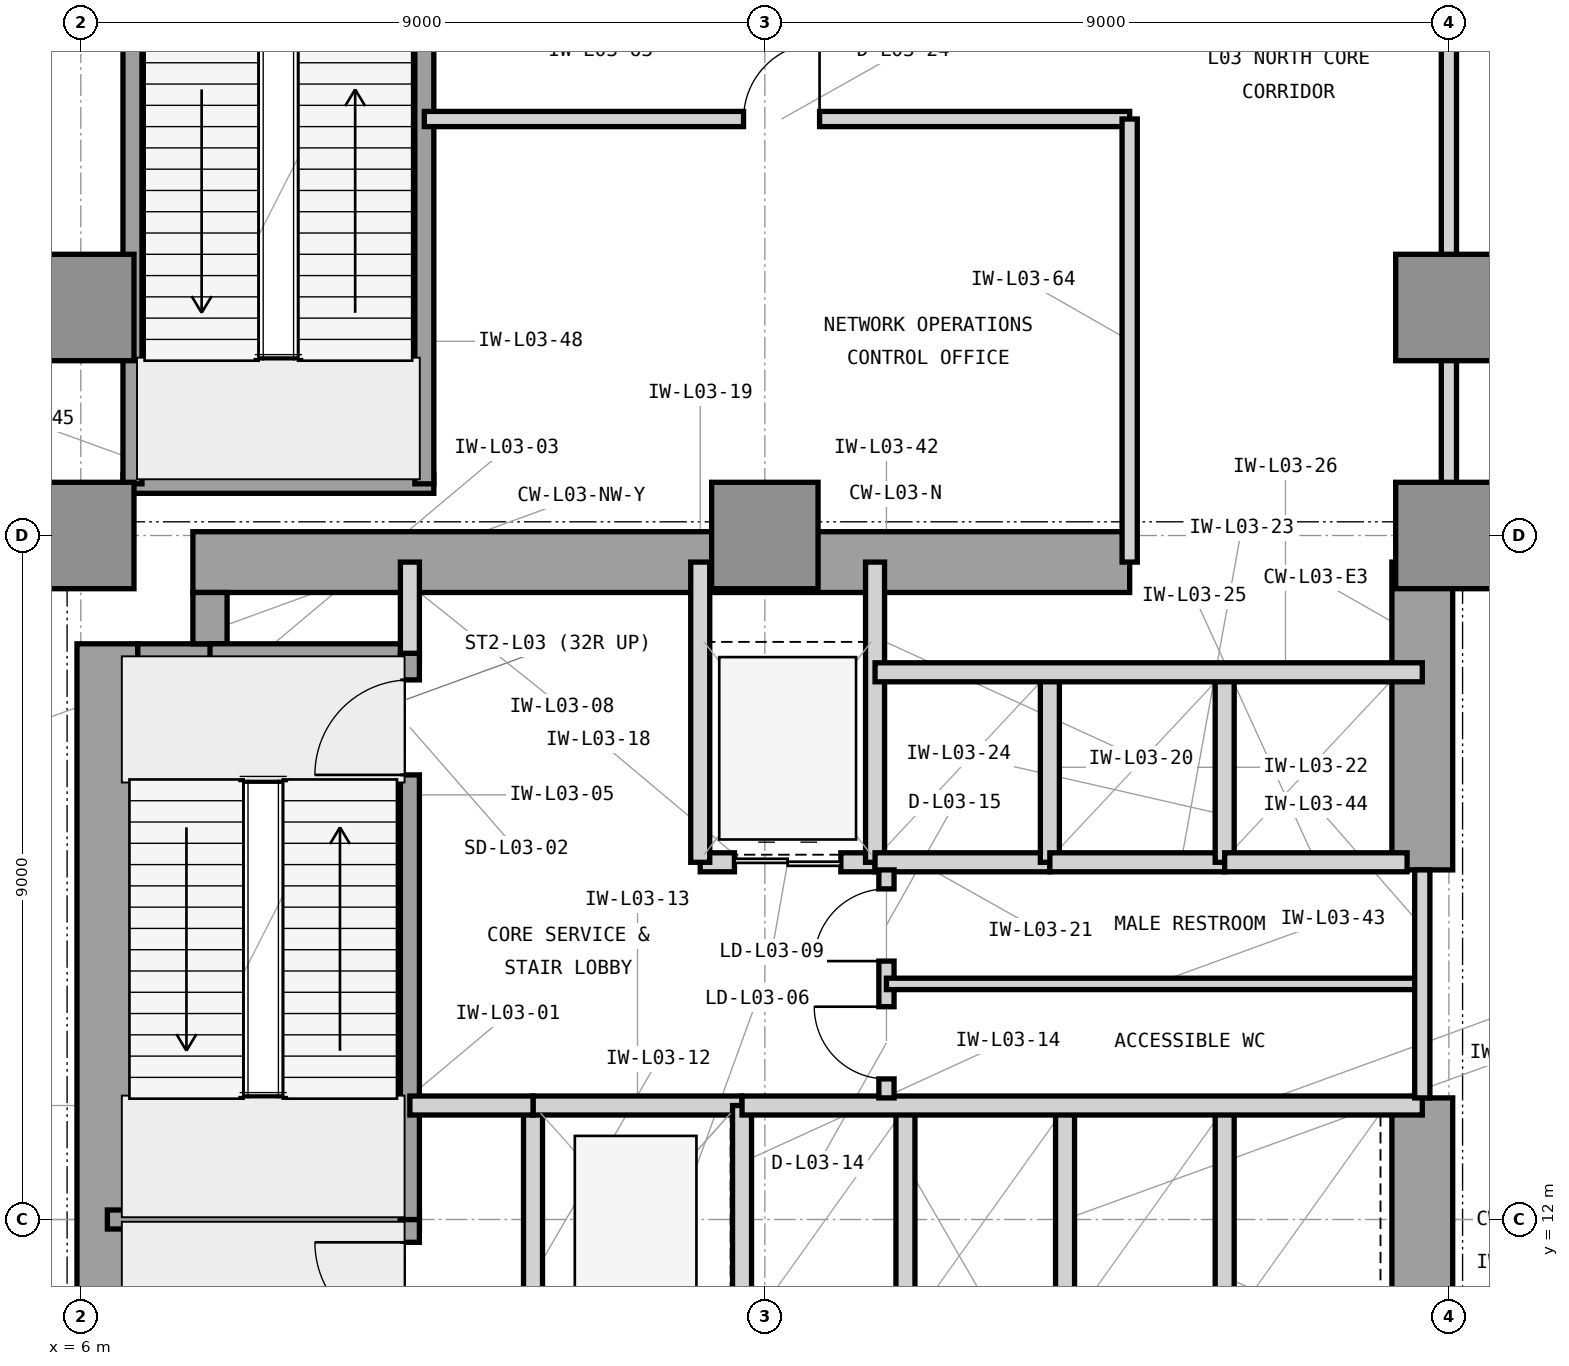
"""IFC4 building model, lengths in metres.
Left out: names, types, materials, properties, quantities, classifications, styles, units other than length and angle.
Written with IfcOpenShell. Run it as: python <this file> out.ifc"""

import sys

from ifc_helpers import new_model, si_unit, direction, frame, frame_2d, origin, origin_2d, place, context, subcontext, project, spatial, rectangle, extrude, element, fill, save


model = new_model("IFC4")
c1 = context("Model", 3, precision=1e-05, world=origin(), true_north=direction((0.0, 1.0)))
c2 = subcontext(c1, "Body", "Model", "MODEL_VIEW")
j1 = project(units=[si_unit("LENGTHUNIT", "METRE"), si_unit("PLANEANGLEUNIT", "RADIAN")], contexts=[c1])
p1 = place(None, origin())
s1 = spatial("IfcSite", under=j1, at=p1, CompositionType="ELEMENT")
p2 = place(p1, origin())
s2 = spatial("IfcBuilding", under=s1, at=p2, CompositionType="ELEMENT")
p3 = place(p2, frame((0.0, 0.0, 16.2)))
s3 = spatial("IfcBuildingStorey", under=s2, at=p3, CompositionType="ELEMENT", Elevation=16.2)
p4 = place(p3, frame((6.35, 4.425, 0.0), z_axis=(0.0, 0.0, 1.0), x_axis=(0.0, 1.0, 0.0)))
e1 = element("IfcWall", 1, at=p4, inside=s3, PredefinedType="SHEAR", context=c2, shape_type="SweptSolid", body=[
    extrude(rectangle(XDim=15.15, YDim=0.8, at=frame_2d((7.575, 0.0))), origin(), (0.0, 0.0, 1.0), 5.4),
])
p5 = place(p3, frame((7.475, 20.65, 0.0), z_axis=(0.0, 0.0, 1.0), x_axis=(1.0, 0.0, 0.0)))
e2 = element("IfcWall", 2, at=p5, inside=s3, PredefinedType="SHEAR", context=c2, shape_type="SweptSolid", body=[
    extrude(rectangle(XDim=12.325, YDim=0.8, at=frame_2d((6.163, 0.0))), origin(), (0.0, 0.0, 1.0), 5.4),
])
p6 = place(p3, frame((23.65, 10.4, 0.0), z_axis=(0.0, 0.0, 1.0), x_axis=(0.0, 1.0, 0.0)))
e3 = element("IfcWall", 3, at=p6, inside=s3, PredefinedType="SHEAR", context=c2, shape_type="SweptSolid", body=[
    extrude(rectangle(XDim=3.2, YDim=0.8, at=frame_2d((1.6, 0.0))), origin(), (0.0, 0.0, 1.0), 5.4),
])
p7 = place(p3, frame((23.65, 16.6, 0.0), z_axis=(0.0, 0.0, 1.0), x_axis=(0.0, 1.0, 0.0)))
e4 = element("IfcWall", 4, at=p7, inside=s3, PredefinedType="SHEAR", context=c2, shape_type="SweptSolid", body=[
    extrude(rectangle(XDim=4.05, YDim=0.8, at=frame_2d((2.025, 0.0))), origin(), (0.0, 0.0, 1.0), 5.4),
])
p8 = place(p3, frame((6.75, 19.35, 0.0), z_axis=(0.0, 0.0, 1.0), x_axis=(1.0, 0.0, 0.0)))
e5 = element("IfcWall", 5, at=p8, inside=s3, PredefinedType="SHEAR", context=c2, shape_type="SweptSolid", body=[
    extrude(rectangle(XDim=1.175, YDim=0.45, at=frame_2d((0.587, 0.0))), origin(), (0.0, 0.0, 1.0), 5.4),
])
p9 = place(p3, frame((7.7, 19.575, 0.0), z_axis=(0.0, 0.0, 1.0), x_axis=(0.0, 1.0, 0.0)))
e6 = element("IfcWall", 6, at=p9, inside=s3, PredefinedType="SHEAR", context=c2, shape_type="SweptSolid", body=[
    extrude(rectangle(XDim=0.675, YDim=0.45, at=frame_2d((0.337, 0.0))), origin(), (0.0, 0.0, 1.0), 5.4),
])
for number, where, z_axis, x_axis in (
    (7, (6.0, 21.0, -0.6), (0.0, 0.0, 1.0), (1.0, 0.0, 0.0)),
    (8, (15.0, 21.0, -0.6), (0.0, 0.0, 1.0), (1.0, 0.0, 0.0)),
    (9, (24.0, 21.0, -0.6), (0.0, 0.0, 1.0), (1.0, 0.0, 0.0)),
    (10, (6.0, 24.0, -0.6), (0.0, 0.0, 1.0), (1.0, 0.0, 0.0)),
    (11, (24.0, 24.0, -0.6), (0.0, 0.0, 1.0), (1.0, 0.0, 0.0)),
):
    element("IfcColumn", number, at=place(p3, frame(where, z_axis=z_axis, x_axis=x_axis)), inside=s3, PredefinedType="COLUMN", context=c2, shape_type="SweptSolid", body=[
        extrude(rectangle(XDim=1.4, YDim=1.4, at=origin_2d()), origin(), (0.0, 0.0, 1.0), 6.0),
    ])
p10 = place(p3, frame((6.35, 12.0, 0.0), z_axis=(0.0, 0.0, 1.0), x_axis=(1.0, 0.0, 0.0)))
e12 = element("IfcWall", 12, at=p10, inside=s3, PredefinedType="SHEAR", context=c2, shape_type="SweptSolid", body=[
    extrude(rectangle(XDim=4.105, YDim=0.25, at=frame_2d((2.052, 0.0))), origin(), (0.0, 0.0, 1.0), 5.4),
])
p11 = place(p3, frame((7.7, 19.45, 0.0), z_axis=(0.0, 0.0, 1.0), x_axis=(1.0, 0.0, 0.0)))
e13 = element("IfcWall", 13, at=p11, inside=s3, PredefinedType="SHEAR", context=c2, shape_type="SweptSolid", body=[
    extrude(rectangle(XDim=2.755, YDim=0.25, at=frame_2d((1.377, 0.0))), origin(), (0.0, 0.0, 1.0), 5.4),
])
p12 = place(p3, frame((10.33, 4.55, 0.0), z_axis=(0.0, 0.0, 1.0), x_axis=(0.0, 1.0, 0.0)))
e14 = element("IfcWall", 14, at=p12, inside=s3, PredefinedType="SHEAR", context=c2, shape_type="SweptSolid", body=[
    extrude(rectangle(XDim=7.45, YDim=0.25, at=frame_2d((3.725, 0.0))), origin(), (0.0, 0.0, 1.0), 5.4),
])
p13 = place(p12, frame((5.9, 0.0, 0.0)))
e15 = element("IfcOpeningElement", 15, at=p13, cuts=e14, PredefinedType="OPENING", context=c2, shape_type="SweptSolid", body=[
    extrude(rectangle(XDim=1.25, YDim=2.2, at=frame_2d((0.625, 1.1))), frame((0.0, 0.135, 0.0), z_axis=(0.0, -1.0, 0.0), x_axis=(1.0, 0.0, 0.0)), (0.0, 0.0, 1.0), 0.27),
])
p14 = place(p3, frame((10.33, 12.0, 0.0), z_axis=(0.0, 0.0, 1.0), x_axis=(0.0, 1.0, 0.0)))
e16 = element("IfcWall", 16, at=p14, inside=s3, PredefinedType="SHEAR", context=c2, shape_type="SweptSolid", body=[
    extrude(rectangle(XDim=7.45, YDim=0.25, at=frame_2d((3.725, 0.0))), origin(), (0.0, 0.0, 1.0), 5.4),
])
p15 = place(p14, frame((5.85, 0.0, 0.0)))
e17 = element("IfcOpeningElement", 17, at=p15, cuts=e16, PredefinedType="OPENING", context=c2, shape_type="SweptSolid", body=[
    extrude(rectangle(XDim=1.25, YDim=2.2, at=frame_2d((0.625, 1.1))), frame((0.0, 0.135, 0.0), z_axis=(0.0, -1.0, 0.0), x_axis=(1.0, 0.0, 0.0)), (0.0, 0.0, 1.0), 0.27),
])
p16 = place(p3, frame((10.33, 19.45, 0.0), z_axis=(0.0, 0.0, 1.0), x_axis=(0.0, 1.0, 0.0)))
e18 = element("IfcWall", 18, at=p16, inside=s3, PredefinedType="PARTITIONING", context=c2, shape_type="SweptSolid", body=[
    extrude(rectangle(XDim=1.2, YDim=0.25, at=frame_2d((0.6, 0.0))), origin(), (0.0, 0.0, 1.0), 4.314),
])
p17 = place(p3, frame((11.95, 10.5, 0.0), z_axis=(0.0, 0.0, 1.0), x_axis=(0.0, 1.0, 0.0)))
e19 = element("IfcWall", 19, at=p17, inside=s3, PredefinedType="PARTITIONING", context=c2, shape_type="SweptSolid", body=[
    extrude(rectangle(XDim=3.0, YDim=0.25, at=frame_2d((1.5, 0.0))), origin(), (0.0, 0.0, 1.0), 5.13),
])
p18 = place(p3, frame((11.95, 13.5, 0.0), z_axis=(0.0, 0.0, 1.0), x_axis=(1.0, 0.0, 0.0)))
e20 = element("IfcWall", 20, at=p18, inside=s3, PredefinedType="PARTITIONING", context=c2, shape_type="SweptSolid", body=[
    extrude(rectangle(XDim=2.75, YDim=0.25, at=frame_2d((1.375, 0.0))), origin(), (0.0, 0.0, 1.0), 4.626),
])
p19 = place(p3, frame((14.7, 10.5, 0.0), z_axis=(0.0, 0.0, 1.0), x_axis=(0.0, 1.0, 0.0)))
e21 = element("IfcWall", 21, at=p19, inside=s3, PredefinedType="PARTITIONING", context=c2, shape_type="SweptSolid", body=[
    extrude(rectangle(XDim=3.0, YDim=0.25, at=frame_2d((1.5, 0.0))), origin(), (0.0, 0.0, 1.0), 5.13),
])
p20 = place(p3, frame((10.33, 13.5, 0.0), z_axis=(0.0, 0.0, 1.0), x_axis=(1.0, 0.0, 0.0)))
e22 = element("IfcWall", 22, at=p20, inside=s3, PredefinedType="PARTITIONING", context=c2, shape_type="SweptSolid", body=[
    extrude(rectangle(XDim=1.62, YDim=0.25, at=frame_2d((0.81, 0.0))), origin(), (0.0, 0.0, 1.0), 4.626),
])
p21 = place(p3, frame((14.15, 16.7, 0.0), z_axis=(0.0, 0.0, 1.0), x_axis=(1.0, 0.0, 0.0)))
e23 = element("IfcWall", 23, at=p21, inside=s3, PredefinedType="PARTITIONING", context=c2, shape_type="SweptSolid", body=[
    extrude(rectangle(XDim=2.3, YDim=0.25, at=frame_2d((1.15, 0.0))), origin(), (0.0, 0.0, 1.0), 4.626),
])
p22 = place(p21, frame((0.45, 0.0, 0.0)))
e24 = element("IfcOpeningElement", 24, at=p22, cuts=e23, PredefinedType="OPENING", context=c2, shape_type="SweptSolid", body=[
    extrude(rectangle(XDim=1.4, YDim=2.35, at=frame_2d((0.7, 1.175))), frame((0.0, 0.135, 0.0), z_axis=(0.0, -1.0, 0.0), x_axis=(1.0, 0.0, 0.0)), (0.0, 0.0, 1.0), 0.27),
])
for number, where, z_axis, x_axis in (
    (25, (14.15, 16.7, 0.0), (0.0, 0.0, 1.0), (0.0, 1.0, 0.0)),
    (26, (16.45, 16.7, 0.0), (0.0, 0.0, 1.0), (0.0, 1.0, 0.0)),
):
    element("IfcWall", number, at=place(p3, frame(where, z_axis=z_axis, x_axis=x_axis)), inside=s3, PredefinedType="PARTITIONING", context=c2, shape_type="SweptSolid", body=[
        extrude(rectangle(XDim=3.95, YDim=0.25, at=frame_2d((1.975, 0.0))), origin(), (0.0, 0.0, 1.0), 5.13),
    ])
p23 = place(p3, frame((16.45, 16.7, 0.0), z_axis=(0.0, 0.0, 1.0), x_axis=(1.0, 0.0, 0.0)))
e27 = element("IfcWall", 27, at=p23, inside=s3, PredefinedType="PARTITIONING", context=c2, shape_type="SweptSolid", body=[
    extrude(rectangle(XDim=2.3, YDim=0.25, at=frame_2d((1.15, 0.0))), origin(), (0.0, 0.0, 1.0), 4.626),
])
p24 = place(p3, frame((18.75, 16.7, 0.0), z_axis=(0.0, 0.0, 1.0), x_axis=(0.0, 1.0, 0.0)))
e28 = element("IfcWall", 28, at=p24, inside=s3, PredefinedType="PARTITIONING", context=c2, shape_type="SweptSolid", body=[
    extrude(rectangle(XDim=2.5, YDim=0.25, at=frame_2d((1.25, 0.0))), origin(), (0.0, 0.0, 1.0), 5.13),
])
p25 = place(p3, frame((18.75, 16.7, 0.0), z_axis=(0.0, 0.0, 1.0), x_axis=(1.0, 0.0, 0.0)))
e29 = element("IfcWall", 29, at=p25, inside=s3, PredefinedType="PARTITIONING", context=c2, shape_type="SweptSolid", body=[
    extrude(rectangle(XDim=2.3, YDim=0.25, at=frame_2d((1.15, 0.0))), origin(), (0.0, 0.0, 1.0), 4.626),
])
p26 = place(p3, frame((21.05, 16.7, 0.0), z_axis=(0.0, 0.0, 1.0), x_axis=(0.0, 1.0, 0.0)))
e30 = element("IfcWall", 30, at=p26, inside=s3, PredefinedType="PARTITIONING", context=c2, shape_type="SweptSolid", body=[
    extrude(rectangle(XDim=2.5, YDim=0.25, at=frame_2d((1.25, 0.0))), origin(), (0.0, 0.0, 1.0), 5.13),
])
p27 = place(p3, frame((21.05, 16.7, 0.0), z_axis=(0.0, 0.0, 1.0), x_axis=(1.0, 0.0, 0.0)))
e31 = element("IfcWall", 31, at=p27, inside=s3, PredefinedType="PARTITIONING", context=c2, shape_type="SweptSolid", body=[
    extrude(rectangle(XDim=2.4, YDim=0.25, at=frame_2d((1.2, 0.0))), origin(), (0.0, 0.0, 1.0), 4.626),
])
p28 = place(p3, frame((16.45, 19.2, 0.0), z_axis=(0.0, 0.0, 1.0), x_axis=(1.0, 0.0, 0.0)))
e32 = element("IfcWall", 32, at=p28, inside=s3, PredefinedType="PARTITIONING", context=c2, shape_type="SweptSolid", body=[
    extrude(rectangle(XDim=7.2, YDim=0.25, at=frame_2d((3.6, 0.0))), origin(), (0.0, 0.0, 1.0), 5.13),
])
for number, where, z_axis, x_axis in (
    (33, (16.85, 10.5, 0.0), (0.0, 0.0, 1.0), (0.0, 1.0, 0.0)),
    (34, (18.95, 10.5, 0.0), (0.0, 0.0, 1.0), (0.0, 1.0, 0.0)),
    (35, (21.05, 10.5, 0.0), (0.0, 0.0, 1.0), (0.0, 1.0, 0.0)),
):
    element("IfcWall", number, at=place(p3, frame(where, z_axis=z_axis, x_axis=x_axis)), inside=s3, PredefinedType="PARTITIONING", context=c2, shape_type="SweptSolid", body=[
        extrude(rectangle(XDim=3.0, YDim=0.25, at=frame_2d((1.5, 0.0))), origin(), (0.0, 0.0, 1.0), 5.13),
    ])
p29 = place(p3, frame((14.7, 13.5, 0.0), z_axis=(0.0, 0.0, 1.0), x_axis=(1.0, 0.0, 0.0)))
e36 = element("IfcWall", 36, at=p29, inside=s3, PredefinedType="PARTITIONING", context=c2, shape_type="SweptSolid", body=[
    extrude(rectangle(XDim=8.95, YDim=0.25, at=frame_2d((4.475, 0.0))), origin(), (0.0, 0.0, 1.0), 4.626),
])
p30 = place(p3, frame((16.6, 13.6, 0.0), z_axis=(0.0, 0.0, 1.0), x_axis=(0.0, 1.0, 0.0)))
e37 = element("IfcWall", 37, at=p30, inside=s3, PredefinedType="PARTITIONING", context=c2, shape_type="SweptSolid", body=[
    extrude(rectangle(XDim=3.0, YDim=0.2, at=frame_2d((1.5, 0.0))), origin(), (0.0, 0.0, 1.0), 5.13),
])
p31 = place(p30, frame((0.25, 0.0, 0.0)))
e38 = element("IfcOpeningElement", 38, at=p31, cuts=e37, PredefinedType="OPENING", context=c2, shape_type="SweptSolid", body=[
    extrude(rectangle(XDim=0.95, YDim=2.1, at=frame_2d((0.475, 1.05))), frame((0.0, 0.11, 0.0), z_axis=(0.0, -1.0, 0.0), x_axis=(1.0, 0.0, 0.0)), (0.0, 0.0, 1.0), 0.22),
])
p32 = place(p30, frame((1.8, 0.0, 0.0)))
e39 = element("IfcOpeningElement", 39, at=p32, cuts=e37, PredefinedType="OPENING", context=c2, shape_type="SweptSolid", body=[
    extrude(rectangle(XDim=0.95, YDim=2.1, at=frame_2d((0.475, 1.05))), frame((0.0, 0.11, 0.0), z_axis=(0.0, -1.0, 0.0), x_axis=(1.0, 0.0, 0.0)), (0.0, 0.0, 1.0), 0.22),
])
p33 = place(p3, frame((16.6, 15.1, 0.0), z_axis=(0.0, 0.0, 1.0), x_axis=(1.0, 0.0, 0.0)))
e40 = element("IfcWall", 40, at=p33, inside=s3, PredefinedType="PARTITIONING", context=c2, shape_type="SweptSolid", body=[
    extrude(rectangle(XDim=7.05, YDim=0.15, at=frame_2d((3.525, 0.0))), origin(), (0.0, 0.0, 1.0), 5.13),
])
p34 = place(p3, frame((23.65, 13.6, 0.0), z_axis=(0.0, 0.0, 1.0), x_axis=(0.0, 1.0, 0.0)))
e41 = element("IfcWall", 41, at=p34, inside=s3, PredefinedType="PARTITIONING", context=c2, shape_type="SweptSolid", body=[
    extrude(rectangle(XDim=3.0, YDim=0.2, at=frame_2d((1.5, 0.0))), origin(), (0.0, 0.0, 1.0), 5.13),
])
p35 = place(p3, frame((6.555, 21.68, 0.0), z_axis=(0.0, 0.0, 1.0), x_axis=(1.0, 0.0, 0.0)))
e42 = element("IfcWall", 42, at=p35, inside=s3, PredefinedType="SHEAR", context=c2, shape_type="SweptSolid", body=[
    extrude(rectangle(XDim=4.09, YDim=0.25, at=frame_2d((2.045, 0.0))), origin(), (0.0, 0.0, 1.0), 5.4),
])
p36 = place(p3, frame((6.68, 21.68, 0.0), z_axis=(0.0, 0.0, 1.0), x_axis=(0.0, 1.0, 0.0)))
e43 = element("IfcWall", 43, at=p36, inside=s3, PredefinedType="SHEAR", context=c2, shape_type="SweptSolid", body=[
    extrude(rectangle(XDim=7.5, YDim=0.25, at=frame_2d((3.75, 0.0))), origin(), (0.0, 0.0, 1.0), 5.4),
])
p37 = place(p3, frame((10.52, 21.68, 0.0), z_axis=(0.0, 0.0, 1.0), x_axis=(0.0, 1.0, 0.0)))
e44 = element("IfcWall", 44, at=p37, inside=s3, PredefinedType="SHEAR", context=c2, shape_type="SweptSolid", body=[
    extrude(rectangle(XDim=7.5, YDim=0.25, at=frame_2d((3.75, 0.0))), origin(), (0.0, 0.0, 1.0), 5.4),
])
p38 = place(p37, frame((6.02, 0.0, 0.0)))
e45 = element("IfcOpeningElement", 45, at=p38, cuts=e44, PredefinedType="OPENING", context=c2, shape_type="SweptSolid", body=[
    extrude(rectangle(XDim=1.25, YDim=2.2, at=frame_2d((0.625, 1.1))), frame((0.0, 0.135, 0.0), z_axis=(0.0, -1.0, 0.0), x_axis=(1.0, 0.0, 0.0)), (0.0, 0.0, 1.0), 0.27),
])
p39 = place(p3, frame((24.0, 21.0, 0.0), z_axis=(0.0, 0.0, 1.0), x_axis=(1.0, 0.0, 0.0)))
e46 = element("IfcWall", 46, at=p39, inside=s3, PredefinedType="PARTITIONING", context=c2, shape_type="SweptSolid", body=[
    extrude(rectangle(XDim=44.79, YDim=0.2, at=frame_2d((22.395, 0.0))), origin(), (0.0, 0.0, 1.0), 4.434),
])
p40 = place(p39, frame((3.5, 0.0, 0.0)))
e47 = element("IfcOpeningElement", 47, at=p40, cuts=e46, PredefinedType="OPENING", context=c2, shape_type="SweptSolid", body=[
    extrude(rectangle(XDim=1.6, YDim=2.3, at=frame_2d((0.8, 1.15))), frame((0.0, 0.11, 0.0), z_axis=(0.0, -1.0, 0.0), x_axis=(1.0, 0.0, 0.0)), (0.0, 0.0, 1.0), 0.22),
])
p41 = place(p39, frame((41.2, 0.0, 0.0)))
e48 = element("IfcOpeningElement", 48, at=p41, cuts=e46, PredefinedType="OPENING", context=c2, shape_type="SweptSolid", body=[
    extrude(rectangle(XDim=1.6, YDim=2.3, at=frame_2d((0.8, 1.15))), frame((0.0, 0.11, 0.0), z_axis=(0.0, -1.0, 0.0), x_axis=(1.0, 0.0, 0.0)), (0.0, 0.0, 1.0), 0.22),
])
p42 = place(p3, frame((24.0, 21.0, 0.0), z_axis=(0.0, 0.0, 1.0), x_axis=(0.0, 1.0, 0.0)))
e49 = element("IfcWall", 49, at=p42, inside=s3, PredefinedType="PARTITIONING", context=c2, shape_type="SweptSolid", body=[
    extrude(rectangle(XDim=26.58, YDim=0.2, at=frame_2d((13.29, 0.0))), origin(), (0.0, 0.0, 1.0), 4.434),
])
p43 = place(p3, frame((10.52, 26.48, 0.0), z_axis=(0.0, 0.0, 1.0), x_axis=(1.0, 0.0, 0.0)))
e50 = element("IfcWall", 50, at=p43, inside=s3, PredefinedType="PARTITIONING", context=c2, shape_type="SweptSolid", body=[
    extrude(rectangle(XDim=9.28, YDim=0.2, at=frame_2d((4.64, 0.0))), origin(), (0.0, 0.0, 1.0), 5.13),
])
p44 = place(p43, frame((4.2, 0.0, 0.0)))
e51 = element("IfcOpeningElement", 51, at=p44, cuts=e50, PredefinedType="OPENING", context=c2, shape_type="SweptSolid", body=[
    extrude(rectangle(XDim=1.0, YDim=2.15, at=frame_2d((0.5, 1.075))), frame((0.0, 0.11, 0.0), z_axis=(0.0, -1.0, 0.0), x_axis=(1.0, 0.0, 0.0)), (0.0, 0.0, 1.0), 0.22),
])
p45 = place(p3, frame((19.8, 20.65, 0.0), z_axis=(0.0, 0.0, 1.0), x_axis=(0.0, 1.0, 0.0)))
e52 = element("IfcWall", 52, at=p45, inside=s3, PredefinedType="PARTITIONING", context=c2, shape_type="SweptSolid", body=[
    extrude(rectangle(XDim=5.83, YDim=0.2, at=frame_2d((2.915, 0.0))), origin(), (0.0, 0.0, 1.0), 5.13),
])
p46 = place(p13, origin())
e53 = element("IfcDoor", 53, at=p46, inside=s3, OperationType="SINGLE_SWING_RIGHT", PredefinedType="DOOR", context=c2, shape_type="SweptSolid", body=[
    extrude(rectangle(XDim=1.25, YDim=2.2, at=frame_2d((0.625, 1.1))), frame((0.0, 0.025, 0.0), z_axis=(0.0, -1.0, 0.0), x_axis=(1.0, 0.0, 0.0)), (0.0, 0.0, 1.0), 0.05),
])
fill(e15, e53)
p47 = place(p15, origin())
e54 = element("IfcDoor", 54, at=p47, inside=s3, OperationType="SINGLE_SWING_LEFT", PredefinedType="DOOR", context=c2, shape_type="SweptSolid", body=[
    extrude(rectangle(XDim=1.25, YDim=2.2, at=frame_2d((0.625, 1.1))), frame((0.0, 0.025, 0.0), z_axis=(0.0, -1.0, 0.0), x_axis=(1.0, 0.0, 0.0)), (0.0, 0.0, 1.0), 0.05),
])
fill(e17, e54)
p48 = place(p22, origin())
e55 = element("IfcDoor", 55, at=p48, inside=s3, OperationType="DOUBLE_DOOR_SLIDING", PredefinedType="DOOR", context=c2, shape_type="SweptSolid", body=[
    extrude(rectangle(XDim=1.4, YDim=2.35, at=frame_2d((0.7, 1.175))), frame((0.0, 0.025, 0.0), z_axis=(0.0, -1.0, 0.0), x_axis=(1.0, 0.0, 0.0)), (0.0, 0.0, 1.0), 0.05),
])
fill(e24, e55)
p49 = place(p31, origin())
e56 = element("IfcDoor", 56, at=p49, inside=s3, OperationType="SINGLE_SWING_RIGHT", PredefinedType="DOOR", context=c2, shape_type="SweptSolid", body=[
    extrude(rectangle(XDim=0.95, YDim=2.1, at=frame_2d((0.475, 1.05))), frame((0.0, 0.025, 0.0), z_axis=(0.0, -1.0, 0.0), x_axis=(1.0, 0.0, 0.0)), (0.0, 0.0, 1.0), 0.05),
])
fill(e38, e56)
p50 = place(p32, origin())
e57 = element("IfcDoor", 57, at=p50, inside=s3, OperationType="SINGLE_SWING_LEFT", PredefinedType="DOOR", context=c2, shape_type="SweptSolid", body=[
    extrude(rectangle(XDim=0.95, YDim=2.1, at=frame_2d((0.475, 1.05))), frame((0.0, 0.025, 0.0), z_axis=(0.0, -1.0, 0.0), x_axis=(1.0, 0.0, 0.0)), (0.0, 0.0, 1.0), 0.05),
])
fill(e39, e57)
p51 = place(p44, origin())
e58 = element("IfcDoor", 58, at=p51, inside=s3, OperationType="SINGLE_SWING_RIGHT", PredefinedType="DOOR", context=c2, shape_type="SweptSolid", body=[
    extrude(rectangle(XDim=1.0, YDim=2.15, at=frame_2d((0.5, 1.075))), frame((0.0, 0.025, 0.0), z_axis=(0.0, -1.0, 0.0), x_axis=(1.0, 0.0, 0.0)), (0.0, 0.0, 1.0), 0.05),
])
fill(e51, e58)
save(model, sys.argv[1])
